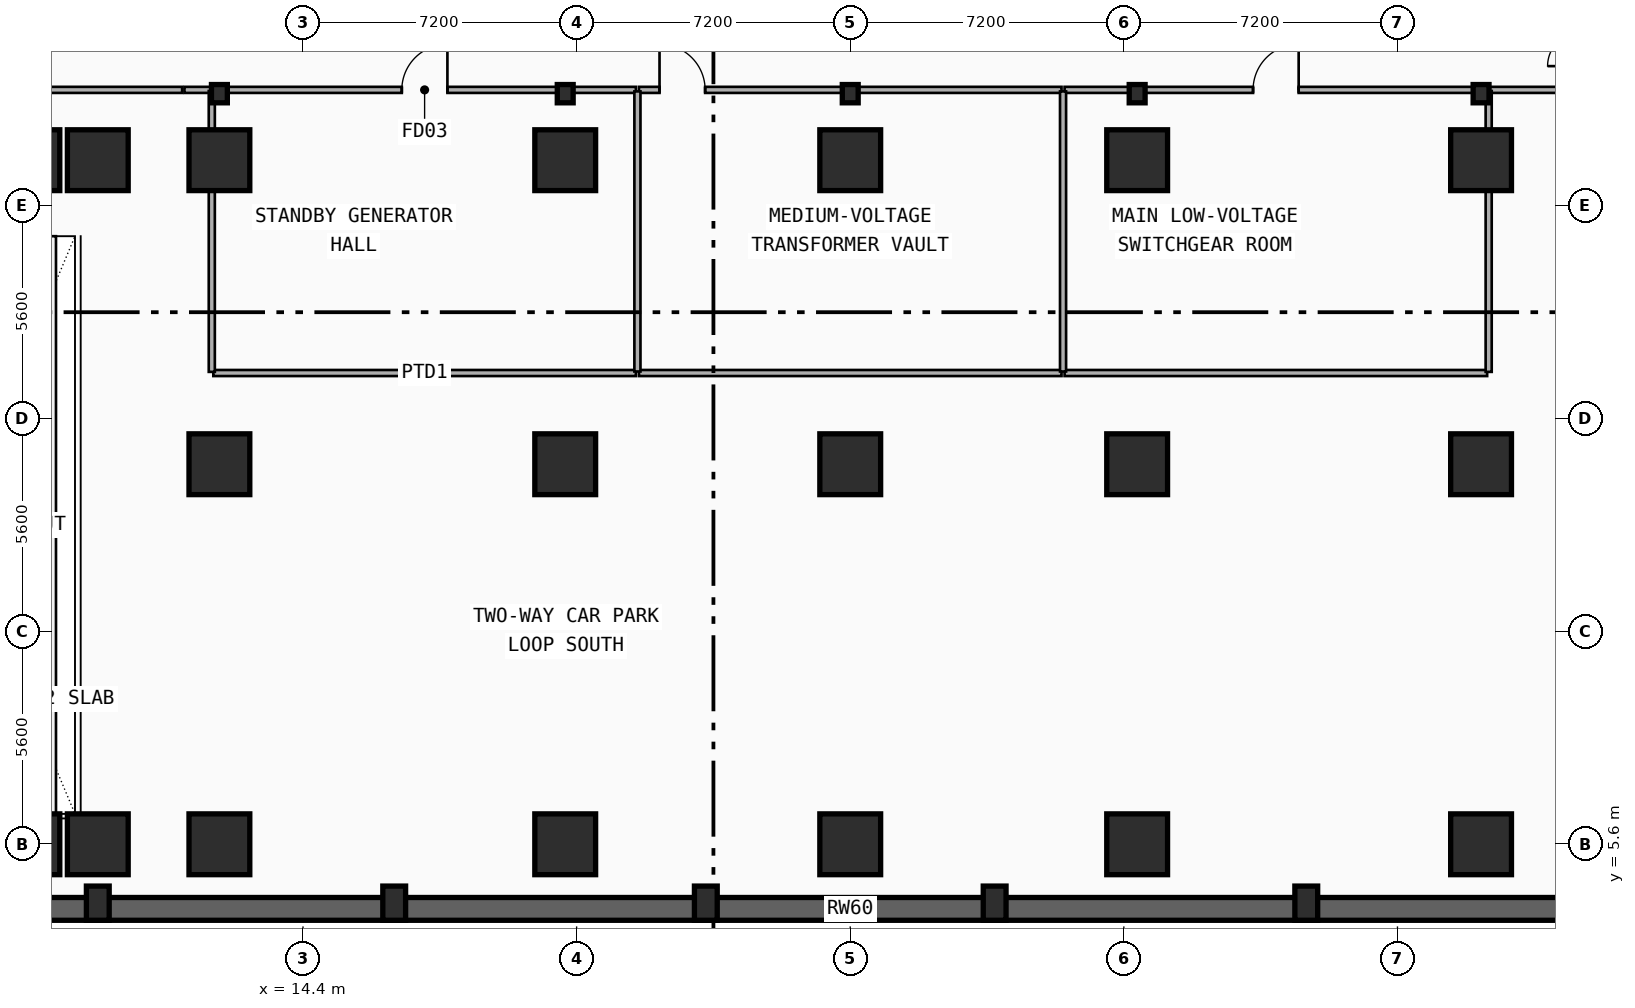
"""IFC4 building model, lengths in metres.
Left out: names, types, materials, properties, quantities, classifications, styles, units other than length and angle.
Written with IfcOpenShell. Run it as: python <this file> out.ifc"""

import sys

from ifc_helpers import new_model, si_unit, direction, frame, frame_2d, origin, origin_2d, place, context, subcontext, project, spatial, rectangle, i_section, extrude, element, fill, save


model = new_model("IFC4")
c1 = context("Model", 3, precision=1e-05, world=origin(), true_north=direction((0.0, 1.0)))
c2 = subcontext(c1, "Body", "Model", "MODEL_VIEW")
j1 = project(units=[si_unit("LENGTHUNIT", "METRE"), si_unit("PLANEANGLEUNIT", "RADIAN")], contexts=[c1])
p1 = place(None, origin())
s1 = spatial("IfcSite", under=j1, at=p1, CompositionType="ELEMENT")
p2 = place(p1, origin())
s2 = spatial("IfcBuilding", under=s1, at=p2, CompositionType="ELEMENT")
p3 = place(p2, frame((0.0, 0.0, -8.8)))
s3 = spatial("IfcBuildingStorey", under=s2, at=p3, CompositionType="ELEMENT", Elevation=-8.8)
p4 = place(p3, frame((0.3, 3.9, 0.0), z_axis=(0.0, 0.0, 1.0), x_axis=(1.0, 0.0, 0.0)))
e1 = element("IfcWall", 1, at=p4, inside=s3, PredefinedType="USERDEFINED", context=c2, shape_type="SweptSolid", body=[
    extrude(rectangle(XDim=57.0, YDim=0.6, at=frame_2d((28.5, 0.0))), origin(), (0.0, 0.0, 1.0), 4.4),
])
for number, where, z_axis, x_axis in (
    (2, (12.2, 25.35, 0.0), (0.0, 0.0, 1.0), (1.0, 0.0, 0.0)),
    (3, (21.3, 25.35, 0.0), (0.0, 0.0, 1.0), (1.0, 0.0, 0.0)),
    (4, (28.8, 25.35, 0.0), (0.0, 0.0, 1.0), (1.0, 0.0, 0.0)),
    (5, (36.35, 25.35, 0.0), (0.0, 0.0, 1.0), (1.0, 0.0, 0.0)),
    (6, (45.4, 25.35, 0.0), (0.0, 0.0, 1.0), (1.0, 0.0, 0.0)),
):
    element("IfcColumn", number, at=place(p3, frame(where, z_axis=z_axis, x_axis=x_axis)), inside=s3, PredefinedType="COLUMN", context=c2, shape_type="SweptSolid", body=[
        extrude(i_section(OverallWidth=0.418, OverallDepth=0.481, WebThickness=0.043, FlangeThickness=0.068, FilletRadius=0.015, at=origin_2d()), origin(), (0.0, 0.0, 1.0), 4.4),
    ])
for number, where, z_axis, x_axis in (
    (7, (7.2, 5.6, 0.0), (0.0, 0.0, 1.0), (1.0, 0.0, 0.0)),
    (8, (7.2, 23.6, 0.0), (0.0, 0.0, 1.0), (1.0, 0.0, 0.0)),
    (9, (9.0, 5.6, 0.0), (0.0, 0.0, 1.0), (1.0, 0.0, 0.0)),
    (10, (9.0, 23.6, 0.0), (0.0, 0.0, 1.0), (1.0, 0.0, 0.0)),
    (11, (12.2, 5.6, 0.0), (0.0, 0.0, 1.0), (1.0, 0.0, 0.0)),
    (12, (12.2, 15.6, 0.0), (0.0, 0.0, 1.0), (1.0, 0.0, 0.0)),
    (13, (12.2, 23.6, 0.0), (0.0, 0.0, 1.0), (1.0, 0.0, 0.0)),
    (14, (21.3, 5.6, 0.0), (0.0, 0.0, 1.0), (1.0, 0.0, 0.0)),
    (15, (21.3, 15.6, 0.0), (0.0, 0.0, 1.0), (1.0, 0.0, 0.0)),
    (16, (21.3, 23.6, 0.0), (0.0, 0.0, 1.0), (1.0, 0.0, 0.0)),
    (17, (28.8, 5.6, 0.0), (0.0, 0.0, 1.0), (1.0, 0.0, 0.0)),
    (18, (28.8, 15.6, 0.0), (0.0, 0.0, 1.0), (1.0, 0.0, 0.0)),
    (19, (28.8, 23.6, 0.0), (0.0, 0.0, 1.0), (1.0, 0.0, 0.0)),
    (20, (36.35, 5.6, 0.0), (0.0, 0.0, 1.0), (1.0, 0.0, 0.0)),
    (21, (36.35, 15.6, 0.0), (0.0, 0.0, 1.0), (1.0, 0.0, 0.0)),
    (22, (36.35, 23.6, 0.0), (0.0, 0.0, 1.0), (1.0, 0.0, 0.0)),
    (23, (45.4, 5.6, 0.0), (0.0, 0.0, 1.0), (1.0, 0.0, 0.0)),
    (24, (45.4, 15.6, 0.0), (0.0, 0.0, 1.0), (1.0, 0.0, 0.0)),
    (25, (45.4, 23.6, 0.0), (0.0, 0.0, 1.0), (1.0, 0.0, 0.0)),
):
    element("IfcColumn", number, at=place(p3, frame(where, z_axis=z_axis, x_axis=x_axis)), inside=s3, PredefinedType="COLUMN", context=c2, shape_type="SweptSolid", body=[
        extrude(rectangle(XDim=1.6, YDim=1.6, at=origin_2d()), origin(), (0.0, 0.0, 1.0), 4.4),
    ])
for number, where, z_axis, x_axis in (
    (26, (9.0, 4.05, 0.0), (0.0, 0.0, 1.0), (1.0, 0.0, 0.0)),
    (27, (16.8, 4.05, 0.0), (0.0, 0.0, 1.0), (1.0, 0.0, 0.0)),
    (28, (25.0, 4.05, 0.0), (0.0, 0.0, 1.0), (1.0, 0.0, 0.0)),
    (29, (32.6, 4.05, 0.0), (0.0, 0.0, 1.0), (1.0, 0.0, 0.0)),
    (30, (40.8, 4.05, 0.0), (0.0, 0.0, 1.0), (1.0, 0.0, 0.0)),
):
    element("IfcColumn", number, at=place(p3, frame(where, z_axis=z_axis, x_axis=x_axis)), inside=s3, PredefinedType="PILASTER", context=c2, shape_type="SweptSolid", body=[
        extrude(rectangle(XDim=0.6, YDim=0.9, at=origin_2d()), origin(), (0.0, 0.0, 1.0), 4.4),
    ])
p5 = place(p3, frame((12.04, 25.45, 0.0), z_axis=(0.0, 0.0, 1.0), x_axis=(1.0, 0.0, 0.0)))
e31 = element("IfcWall", 31, at=p5, inside=s3, PredefinedType="PARTITIONING", context=c2, shape_type="SweptSolid", body=[
    extrude(rectangle(XDim=11.12, YDim=0.16, at=frame_2d((5.56, 0.0))), origin(), (0.0, 0.0, 1.0), 3.246),
])
p6 = place(p5, frame((4.96, 0.0, 0.0)))
e32 = element("IfcOpeningElement", 32, at=p6, cuts=e31, PredefinedType="OPENING", context=c2, shape_type="SweptSolid", body=[
    extrude(rectangle(XDim=1.2, YDim=2.15, at=frame_2d((0.6, 1.075))), frame((0.0, 0.09, 0.0), z_axis=(0.0, -1.0, 0.0), x_axis=(1.0, 0.0, 0.0)), (0.0, 0.0, 1.0), 0.18),
])
p7 = place(p3, frame((23.24, 25.45, 0.0), z_axis=(0.0, 0.0, 1.0), x_axis=(1.0, 0.0, 0.0)))
e33 = element("IfcWall", 33, at=p7, inside=s3, PredefinedType="PARTITIONING", context=c2, shape_type="SweptSolid", body=[
    extrude(rectangle(XDim=11.12, YDim=0.16, at=frame_2d((5.56, 0.0))), origin(), (0.0, 0.0, 1.0), 4.08),
])
p8 = place(p7, frame((0.542, 0.0, 0.0)))
e34 = element("IfcOpeningElement", 34, at=p8, cuts=e33, PredefinedType="OPENING", context=c2, shape_type="SweptSolid", body=[
    extrude(rectangle(XDim=1.2, YDim=2.15, at=frame_2d((0.6, 1.075))), frame((0.0, 0.09, 0.0), z_axis=(0.0, -1.0, 0.0), x_axis=(1.0, 0.0, 0.0)), (0.0, 0.0, 1.0), 0.18),
])
p9 = place(p3, frame((34.44, 25.45, 0.0), z_axis=(0.0, 0.0, 1.0), x_axis=(1.0, 0.0, 0.0)))
e35 = element("IfcWall", 35, at=p9, inside=s3, PredefinedType="PARTITIONING", context=c2, shape_type="SweptSolid", body=[
    extrude(rectangle(XDim=11.12, YDim=0.16, at=frame_2d((5.56, 0.0))), origin(), (0.0, 0.0, 1.0), 3.246),
])
p10 = place(p9, frame((4.96, 0.0, 0.0)))
e36 = element("IfcOpeningElement", 36, at=p10, cuts=e35, PredefinedType="OPENING", context=c2, shape_type="SweptSolid", body=[
    extrude(rectangle(XDim=1.2, YDim=2.15, at=frame_2d((0.6, 1.075))), frame((0.0, 0.09, 0.0), z_axis=(0.0, -1.0, 0.0), x_axis=(1.0, 0.0, 0.0)), (0.0, 0.0, 1.0), 0.18),
])
p11 = place(p3, frame((12.04, 18.0, 0.0), z_axis=(0.0, 0.0, 1.0), x_axis=(1.0, 0.0, 0.0)))
e37 = element("IfcWall", 37, at=p11, inside=s3, PredefinedType="PARTITIONING", context=c2, shape_type="SweptSolid", body=[
    extrude(rectangle(XDim=11.12, YDim=0.16, at=frame_2d((5.56, 0.0))), origin(), (0.0, 0.0, 1.0), 3.246),
])
p12 = place(p3, frame((23.24, 18.0, 0.0), z_axis=(0.0, 0.0, 1.0), x_axis=(1.0, 0.0, 0.0)))
e38 = element("IfcWall", 38, at=p12, inside=s3, PredefinedType="PARTITIONING", context=c2, shape_type="SweptSolid", body=[
    extrude(rectangle(XDim=11.12, YDim=0.16, at=frame_2d((5.56, 0.0))), origin(), (0.0, 0.0, 1.0), 4.08),
])
p13 = place(p3, frame((34.44, 18.0, 0.0), z_axis=(0.0, 0.0, 1.0), x_axis=(1.0, 0.0, 0.0)))
e39 = element("IfcWall", 39, at=p13, inside=s3, PredefinedType="PARTITIONING", context=c2, shape_type="SweptSolid", body=[
    extrude(rectangle(XDim=11.12, YDim=0.16, at=frame_2d((5.56, 0.0))), origin(), (0.0, 0.0, 1.0), 3.246),
])
for number, where, z_axis, x_axis in (
    (40, (23.2, 18.04, 0.0), (0.0, 0.0, 1.0), (0.0, 1.0, 0.0)),
    (41, (34.4, 18.04, 0.0), (0.0, 0.0, 1.0), (0.0, 1.0, 0.0)),
):
    element("IfcWall", number, at=place(p3, frame(where, z_axis=z_axis, x_axis=x_axis)), inside=s3, PredefinedType="PARTITIONING", context=c2, shape_type="SweptSolid", body=[
        extrude(rectangle(XDim=7.37, YDim=0.16, at=frame_2d((3.685, 0.0))), origin(), (0.0, 0.0, 1.0), 2.66),
    ])
p14 = place(p3, frame((11.28, 25.45, 0.0), z_axis=(0.0, 0.0, 1.0), x_axis=(1.0, 0.0, 0.0)))
e42 = element("IfcWall", 42, at=p14, inside=s3, PredefinedType="PARTITIONING", context=c2, shape_type="SweptSolid", body=[
    extrude(rectangle(XDim=0.69, YDim=0.16, at=frame_2d((0.345, 0.0))), origin(), (0.0, 0.0, 1.0), 3.246),
])
p15 = place(p3, frame((45.63, 25.45, 0.0), z_axis=(0.0, 0.0, 1.0), x_axis=(1.0, 0.0, 0.0)))
e43 = element("IfcWall", 43, at=p15, inside=s3, PredefinedType="PARTITIONING", context=c2, shape_type="SweptSolid", body=[
    extrude(rectangle(XDim=2.39, YDim=0.16, at=frame_2d((1.195, 0.0))), origin(), (0.0, 0.0, 1.0), 3.246),
])
p16 = place(p3, frame((1.83, 25.45, 0.0), z_axis=(0.0, 0.0, 1.0), x_axis=(1.0, 0.0, 0.0)))
e44 = element("IfcWall", 44, at=p16, inside=s3, PredefinedType="PARTITIONING", context=c2, shape_type="SweptSolid", body=[
    extrude(rectangle(XDim=9.39, YDim=0.16, at=frame_2d((4.695, 0.0))), origin(), (0.0, 0.0, 1.0), 4.08),
])
for number, where, z_axis, x_axis in (
    (45, (12.0, 18.03, 0.0), (0.0, 0.0, 1.0), (0.0, 1.0, 0.0)),
    (46, (45.6, 18.03, 0.0), (0.0, 0.0, 1.0), (0.0, 1.0, 0.0)),
):
    element("IfcWall", number, at=place(p3, frame(where, z_axis=z_axis, x_axis=x_axis)), inside=s3, PredefinedType="PARTITIONING", context=c2, shape_type="SweptSolid", body=[
        extrude(rectangle(XDim=7.39, YDim=0.16, at=frame_2d((3.695, 0.0))), origin(), (0.0, 0.0, 1.0), 2.66),
    ])
p17 = place(p6, origin())
e47 = element("IfcDoor", 47, at=p17, inside=s3, OperationType="SINGLE_SWING_RIGHT", PredefinedType="DOOR", context=c2, shape_type="SweptSolid", body=[
    extrude(rectangle(XDim=1.2, YDim=2.15, at=frame_2d((0.6, 1.075))), frame((0.0, 0.025, 0.0), z_axis=(0.0, -1.0, 0.0), x_axis=(1.0, 0.0, 0.0)), (0.0, 0.0, 1.0), 0.05),
])
fill(e32, e47)
p18 = place(p8, origin())
e48 = element("IfcDoor", 48, at=p18, inside=s3, OperationType="SINGLE_SWING_LEFT", PredefinedType="DOOR", context=c2, shape_type="SweptSolid", body=[
    extrude(rectangle(XDim=1.2, YDim=2.15, at=frame_2d((0.6, 1.075))), frame((0.0, 0.025, 0.0), z_axis=(0.0, -1.0, 0.0), x_axis=(1.0, 0.0, 0.0)), (0.0, 0.0, 1.0), 0.05),
])
fill(e34, e48)
p19 = place(p10, origin())
e49 = element("IfcDoor", 49, at=p19, inside=s3, OperationType="SINGLE_SWING_RIGHT", PredefinedType="DOOR", context=c2, shape_type="SweptSolid", body=[
    extrude(rectangle(XDim=1.2, YDim=2.15, at=frame_2d((0.6, 1.075))), frame((0.0, 0.025, 0.0), z_axis=(0.0, -1.0, 0.0), x_axis=(1.0, 0.0, 0.0)), (0.0, 0.0, 1.0), 0.05),
])
fill(e36, e49)
save(model, sys.argv[1])
